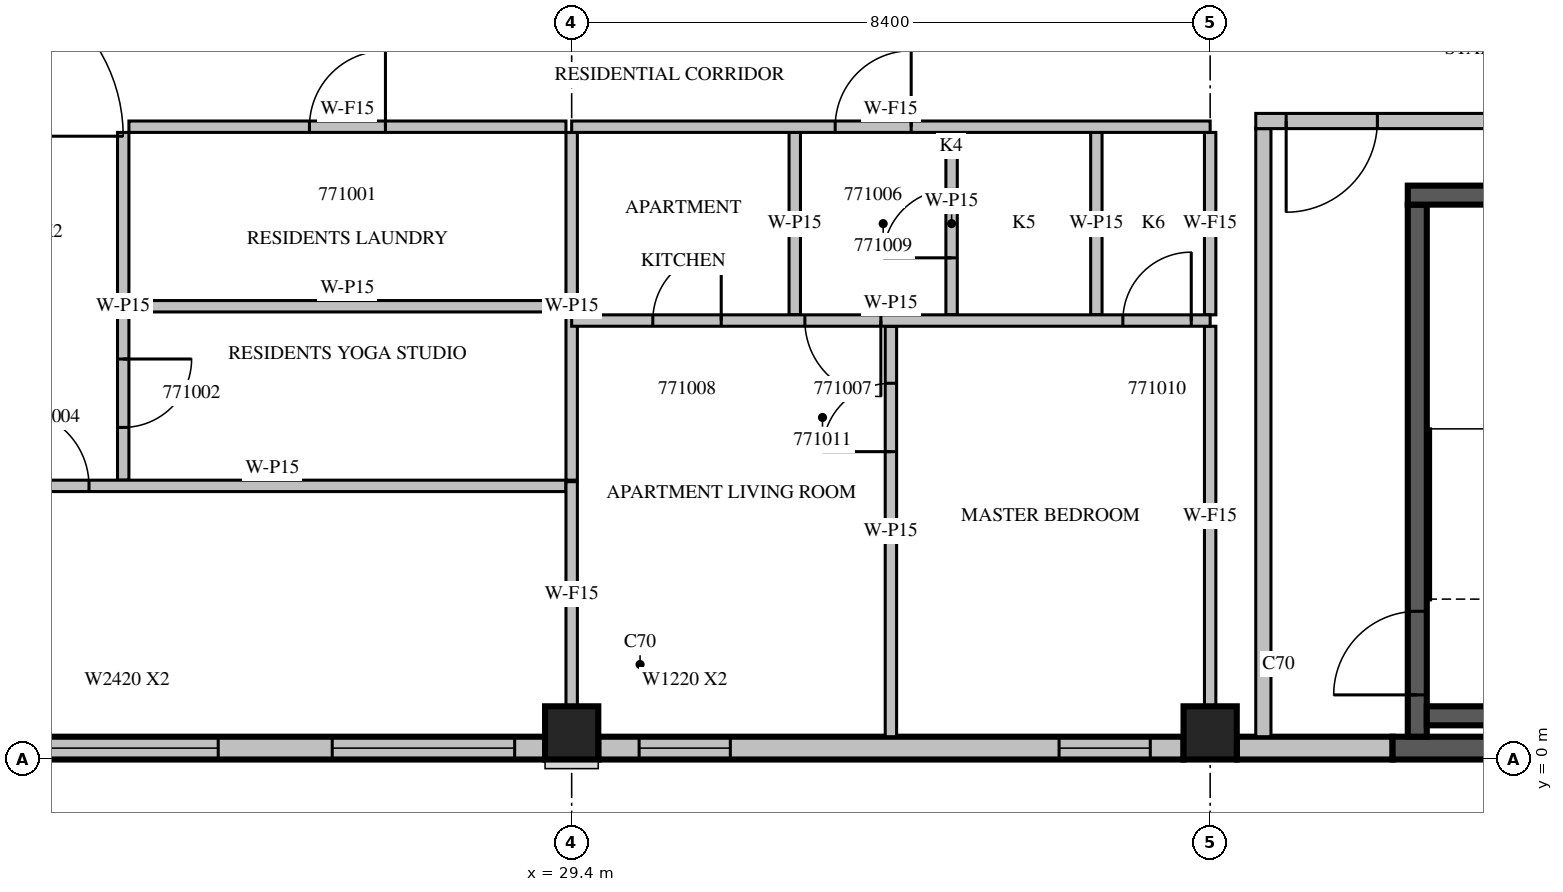
"""IFC4 building model, lengths in metres.
Left out: names, types, materials, properties, quantities, classifications, styles, units other than length and angle.
Written with IfcOpenShell. Run it as: python <this file> out.ifc"""

import sys

from ifc_helpers import new_model, si_unit, direction, frame, frame_2d, origin, origin_2d, place, context, subcontext, project, spatial, rectangle, extrude, source, transform, mapped, element, fill, save


model = new_model("IFC4")
c1 = context("Model", 3, precision=1e-05, world=origin(), true_north=direction((0.0, 1.0)))
c2 = subcontext(c1, "Body", "Model", "MODEL_VIEW")
j1 = project(units=[si_unit("LENGTHUNIT", "METRE"), si_unit("PLANEANGLEUNIT", "RADIAN")], contexts=[c1])
p1 = place(None, origin())
s1 = spatial("IfcSite", under=j1, at=p1, CompositionType="ELEMENT")
p2 = place(p1, origin())
s2 = spatial("IfcBuilding", under=s1, at=p2, CompositionType="ELEMENT")
p3 = place(p2, frame((0.0, 0.0, 309.0)))
s3 = spatial("IfcBuildingStorey", under=s2, at=p3, CompositionType="ELEMENT", Elevation=309.0)
m1 = source(origin(), c2, "Body", "SweptSolid", [
    extrude(rectangle(XDim=0.7, YDim=0.7, at=origin_2d()), origin(), (0.0, 0.0, 1.0), 3.5),
])
for number, where, z_axis, x_axis in (
    (1, (29.4, 0.35, 0.0), (0.0, 0.0, 1.0), (1.0, 0.0, 0.0)),
    (2, (37.8, 0.35, 0.0), (0.0, 0.0, 1.0), (1.0, 0.0, 0.0)),
):
    element("IfcColumn", number, at=place(p3, frame(where, z_axis=z_axis, x_axis=x_axis)), inside=s3, PredefinedType="COLUMN", context=c2, shape_type="MappedRepresentation", body=[
        mapped(m1, transform((0.0, 0.0, 0.0), scale=1.0)),
    ])
m2 = source(origin(), c2, "Body", "SweptSolid", [
    extrude(rectangle(XDim=7.7, YDim=0.3, at=frame_2d((3.85, 0.0))), origin(), (0.0, 0.0, 1.0), 3.1),
])
p4 = place(p3, frame((21.35, 0.15, 0.0), z_axis=(0.0, 0.0, 1.0), x_axis=(1.0, 0.0, 0.0)))
e3 = element("IfcWall", 3, at=p4, inside=s3, PredefinedType="STANDARD", context=c2, shape_type="MappedRepresentation", body=[
    mapped(m2, transform((0.0, 0.0, 0.0), scale=1.0)),
])
m3 = source(origin(), c2, "Body", "SweptSolid", [
    extrude(rectangle(XDim=2.4, YDim=2.0, at=frame_2d((1.2, 1.0))), frame((0.0, 0.16, 0.0), z_axis=(0.0, -1.0, 0.0), x_axis=(1.0, 0.0, 0.0)), (0.0, 0.0, 1.0), 0.32),
])
p5 = place(p4, frame((1.0, 0.0, 0.6)))
e4 = element("IfcOpeningElement", 4, at=p5, cuts=e3, PredefinedType="OPENING", context=c2, shape_type="MappedRepresentation", body=[
    mapped(m3, transform((0.0, 0.0, 0.0), scale=1.0)),
])
p6 = place(p4, frame((4.9, 0.0, 0.6)))
e5 = element("IfcOpeningElement", 5, at=p6, cuts=e3, PredefinedType="OPENING", context=c2, shape_type="MappedRepresentation", body=[
    mapped(m3, transform((0.0, 0.0, 0.0), scale=1.0)),
])
p7 = place(p3, frame((29.75, 0.15, 0.0), z_axis=(0.0, 0.0, 1.0), x_axis=(1.0, 0.0, 0.0)))
e6 = element("IfcWall", 6, at=p7, inside=s3, PredefinedType="STANDARD", context=c2, shape_type="MappedRepresentation", body=[
    mapped(m2, transform((0.0, 0.0, 0.0), scale=1.0)),
])
m4 = source(origin(), c2, "Body", "SweptSolid", [
    extrude(rectangle(XDim=1.2, YDim=2.0, at=frame_2d((0.6, 1.0))), frame((0.0, 0.16, 0.0), z_axis=(0.0, -1.0, 0.0), x_axis=(1.0, 0.0, 0.0)), (0.0, 0.0, 1.0), 0.32),
])
p8 = place(p7, frame((0.537, 0.0, 0.6)))
e7 = element("IfcOpeningElement", 7, at=p8, cuts=e6, PredefinedType="OPENING", context=c2, shape_type="MappedRepresentation", body=[
    mapped(m4, transform((0.0, 0.0, 0.0), scale=1.0)),
])
p9 = place(p7, frame((6.062, 0.0, 0.6)))
e8 = element("IfcOpeningElement", 8, at=p9, cuts=e6, PredefinedType="OPENING", context=c2, shape_type="MappedRepresentation", body=[
    mapped(m4, transform((0.0, 0.0, 0.0), scale=1.0)),
])
m5 = source(origin(), c2, "Body", "SweptSolid", [
    extrude(rectangle(XDim=2.05, YDim=0.3, at=frame_2d((1.025, 0.0))), origin(), (0.0, 0.0, 1.0), 3.1),
])
p10 = place(p3, frame((38.15, 0.15, 0.0), z_axis=(0.0, 0.0, 1.0), x_axis=(1.0, 0.0, 0.0)))
e9 = element("IfcWall", 9, at=p10, inside=s3, PredefinedType="STANDARD", context=c2, shape_type="MappedRepresentation", body=[
    mapped(m5, transform((0.0, 0.0, 0.0), scale=1.0)),
])
m6 = source(origin(), c2, "Body", "SweptSolid", [
    extrude(rectangle(XDim=3.8, YDim=0.3, at=frame_2d((1.9, 0.0))), origin(), (0.0, 0.0, 1.0), 3.1),
])
p11 = place(p3, frame((40.2, 0.15, 0.0), z_axis=(0.0, 0.0, 1.0), x_axis=(1.0, 0.0, 0.0)))
e10 = element("IfcWall", 10, at=p11, inside=s3, PredefinedType="SOLIDWALL", context=c2, shape_type="MappedRepresentation", body=[
    mapped(m6, transform((0.0, 0.0, 0.0), scale=1.0)),
])
m7 = source(origin(), c2, "Body", "SweptSolid", [
    extrude(rectangle(XDim=7.0, YDim=0.25, at=frame_2d((3.5, 0.0))), origin(), (0.0, 0.0, 1.0), 3.1),
])
p12 = place(p3, frame((40.525, 0.3, 0.0), z_axis=(0.0, 0.0, 1.0), x_axis=(0.0, 1.0, 0.0)))
e11 = element("IfcWall", 11, at=p12, inside=s3, PredefinedType="SOLIDWALL", context=c2, shape_type="MappedRepresentation", body=[
    mapped(m7, transform((0.0, 0.0, 0.0), scale=1.0)),
])
m8 = source(origin(), c2, "Body", "SweptSolid", [
    extrude(rectangle(XDim=1.1, YDim=2.1, at=frame_2d((0.55, 1.05))), frame((0.0, 0.135, 0.0), z_axis=(0.0, -1.0, 0.0), x_axis=(1.0, 0.0, 0.0)), (0.0, 0.0, 1.0), 0.27),
])
p13 = place(p12, frame((0.55, 0.0, 0.0)))
e12 = element("IfcOpeningElement", 12, at=p13, cuts=e11, PredefinedType="OPENING", context=c2, shape_type="MappedRepresentation", body=[
    mapped(m8, transform((0.0, 0.0, 0.0), scale=1.0)),
])
m9 = source(origin(), c2, "Body", "SweptSolid", [
    extrude(rectangle(XDim=3.45, YDim=0.25, at=frame_2d((1.725, 0.0))), origin(), (0.0, 0.0, 1.0), 3.1),
])
p14 = place(p3, frame((40.4, 7.425, 0.0), z_axis=(0.0, 0.0, 1.0), x_axis=(1.0, 0.0, 0.0)))
e13 = element("IfcWall", 13, at=p14, inside=s3, PredefinedType="SOLIDWALL", context=c2, shape_type="MappedRepresentation", body=[
    mapped(m9, transform((0.0, 0.0, 0.0), scale=1.0)),
])
m10 = source(origin(), c2, "Body", "SweptSolid", [
    extrude(rectangle(XDim=2.95, YDim=0.25, at=frame_2d((1.475, 0.0))), origin(), (0.0, 0.0, 1.0), 3.1),
])
p15 = place(p3, frame((40.65, 0.575, 0.0), z_axis=(0.0, 0.0, 1.0), x_axis=(1.0, 0.0, 0.0)))
e14 = element("IfcWall", 14, at=p15, inside=s3, PredefinedType="SOLIDWALL", context=c2, shape_type="MappedRepresentation", body=[
    mapped(m10, transform((0.0, 0.0, 0.0), scale=1.0)),
])
m11 = source(origin(), c2, "Body", "SweptSolid", [
    extrude(rectangle(XDim=8.0, YDim=0.2, at=frame_2d((4.0, 0.0))), origin(), (0.0, 0.0, 1.0), 3.1),
])
p16 = place(p3, frame((38.5, 0.3, 0.0), z_axis=(0.0, 0.0, 1.0), x_axis=(0.0, 1.0, 0.0)))
e15 = element("IfcWall", 15, at=p16, inside=s3, PredefinedType="PARTITIONING", context=c2, shape_type="MappedRepresentation", body=[
    mapped(m11, transform((0.0, 0.0, 0.0), scale=1.0)),
])
m12 = source(origin(), c2, "Body", "SweptSolid", [
    extrude(rectangle(XDim=5.45, YDim=0.2, at=frame_2d((2.725, 0.0))), origin(), (0.0, 0.0, 1.0), 3.1),
])
p17 = place(p3, frame((38.4, 8.4, 0.0), z_axis=(0.0, 0.0, 1.0), x_axis=(1.0, 0.0, 0.0)))
e16 = element("IfcWall", 16, at=p17, inside=s3, PredefinedType="PARTITIONING", context=c2, shape_type="MappedRepresentation", body=[
    mapped(m12, transform((0.0, 0.0, 0.0), scale=1.0)),
])
m13 = source(origin(), c2, "Body", "SweptSolid", [
    extrude(rectangle(XDim=1.2, YDim=2.1, at=frame_2d((0.6, 1.05))), frame((0.0, 0.11, 0.0), z_axis=(0.0, -1.0, 0.0), x_axis=(1.0, 0.0, 0.0)), (0.0, 0.0, 1.0), 0.22),
])
p18 = place(p17, frame((0.4, 0.0, 0.0)))
e17 = element("IfcOpeningElement", 17, at=p18, cuts=e16, PredefinedType="OPENING", context=c2, shape_type="MappedRepresentation", body=[
    mapped(m13, transform((0.0, 0.0, 0.0), scale=1.0)),
])
m14 = source(origin(), c2, "Body", "SweptSolid", [
    extrude(rectangle(XDim=0.9, YDim=2.1, at=frame_2d((0.45, 1.05))), frame((0.0, 0.11, 0.0), z_axis=(0.0, -1.0, 0.0), x_axis=(1.0, 0.0, 0.0)), (0.0, 0.0, 1.0), 0.22),
])
p19 = place(p17, frame((3.25, 0.0, 0.0)))
e18 = element("IfcOpeningElement", 18, at=p19, cuts=e16, PredefinedType="OPENING", context=c2, shape_type="MappedRepresentation", body=[
    mapped(m14, transform((0.0, 0.0, 0.0), scale=1.0)),
])
m15 = source(origin(), c2, "Body", "SweptSolid", [
    extrude(rectangle(XDim=4.575, YDim=0.15, at=frame_2d((2.288, 0.0))), origin(), (0.0, 0.0, 1.0), 3.1),
])
p20 = place(p3, frame((23.5, 8.25, 0.0), z_axis=(0.0, 0.0, 1.0), x_axis=(0.0, -1.0, 0.0)))
e19 = element("IfcWall", 19, at=p20, inside=s3, PredefinedType="PARTITIONING", context=c2, shape_type="MappedRepresentation", body=[
    mapped(m15, transform((0.0, 0.0, 0.0), scale=1.0)),
])
m16 = source(origin(), c2, "Body", "SweptSolid", [
    extrude(rectangle(XDim=0.9, YDim=2.1, at=frame_2d((0.45, 1.05))), frame((0.0, 0.085, 0.0), z_axis=(0.0, -1.0, 0.0), x_axis=(1.0, 0.0, 0.0)), (0.0, 0.0, 1.0), 0.17),
])
p21 = place(p20, frame((2.981, 0.0, 0.0)))
e20 = element("IfcOpeningElement", 20, at=p21, cuts=e19, PredefinedType="OPENING", context=c2, shape_type="MappedRepresentation", body=[
    mapped(m16, transform((0.0, 0.0, 0.0), scale=1.0)),
])
p22 = place(p3, frame((29.4, 3.675, 0.0), z_axis=(0.0, 0.0, 1.0), x_axis=(0.0, 1.0, 0.0)))
e21 = element("IfcWall", 21, at=p22, inside=s3, PredefinedType="PARTITIONING", context=c2, shape_type="MappedRepresentation", body=[
    mapped(m15, transform((0.0, 0.0, 0.0), scale=1.0)),
])
m17 = source(origin(), c2, "Body", "SweptSolid", [
    extrude(rectangle(XDim=5.75, YDim=0.15, at=frame_2d((2.875, 0.0))), origin(), (0.0, 0.0, 1.0), 3.1),
])
p23 = place(p3, frame((29.325, 8.325, 0.0), z_axis=(0.0, 0.0, 1.0), x_axis=(-1.0, 0.0, 0.0)))
e22 = element("IfcWall", 22, at=p23, inside=s3, PredefinedType="PARTITIONING", context=c2, shape_type="MappedRepresentation", body=[
    mapped(m17, transform((0.0, 0.0, 0.0), scale=1.0)),
])
m18 = source(origin(), c2, "Body", "SweptSolid", [
    extrude(rectangle(XDim=1.0, YDim=2.1, at=frame_2d((0.5, 1.05))), frame((0.0, 0.085, 0.0), z_axis=(0.0, -1.0, 0.0), x_axis=(1.0, 0.0, 0.0)), (0.0, 0.0, 1.0), 0.17),
])
p24 = place(p23, frame((2.375, 0.0, 0.0)))
e23 = element("IfcOpeningElement", 23, at=p24, cuts=e22, PredefinedType="OPENING", context=c2, shape_type="MappedRepresentation", body=[
    mapped(m18, transform((0.0, 0.0, 0.0), scale=1.0)),
])
p25 = place(p3, frame((29.325, 5.963, 0.0), z_axis=(0.0, 0.0, 1.0), x_axis=(-1.0, 0.0, 0.0)))
e24 = element("IfcWall", 24, at=p25, inside=s3, PredefinedType="PARTITIONING", context=c2, shape_type="MappedRepresentation", body=[
    mapped(m17, transform((0.0, 0.0, 0.0), scale=1.0)),
])
m19 = source(origin(), c2, "Body", "SweptSolid", [
    extrude(rectangle(XDim=7.725, YDim=0.15, at=frame_2d((3.862, 0.0))), origin(), (0.0, 0.0, 1.0), 3.1),
])
p26 = place(p3, frame((21.6, 3.6, 0.0), z_axis=(0.0, 0.0, 1.0), x_axis=(1.0, 0.0, 0.0)))
e25 = element("IfcWall", 25, at=p26, inside=s3, PredefinedType="PARTITIONING", context=c2, shape_type="MappedRepresentation", body=[
    mapped(m19, transform((0.0, 0.0, 0.0), scale=1.0)),
])
p27 = place(p26, frame((0.45, 0.0, 0.0)))
e26 = element("IfcOpeningElement", 26, at=p27, cuts=e25, PredefinedType="OPENING", context=c2, shape_type="MappedRepresentation", body=[
    mapped(m18, transform((0.0, 0.0, 0.0), scale=1.0)),
])
p28 = place(p3, frame((33.6, 0.3, 0.0), z_axis=(0.0, 0.0, 1.0), x_axis=(0.0, 1.0, 0.0)))
e27 = element("IfcWall", 27, at=p28, inside=s3, PredefinedType="PARTITIONING", context=c2, shape_type="SweptSolid", body=[
    extrude(rectangle(XDim=5.4, YDim=0.15, at=frame_2d((2.7, 0.0))), origin(), (0.0, 0.0, 1.0), 3.1),
])
p29 = place(p28, frame((3.75, 0.0, 0.0)))
e28 = element("IfcOpeningElement", 28, at=p29, cuts=e27, PredefinedType="OPENING", context=c2, shape_type="MappedRepresentation", body=[
    mapped(m16, transform((0.0, 0.0, 0.0), scale=1.0)),
])
m20 = source(origin(), c2, "Body", "SweptSolid", [
    extrude(rectangle(XDim=2.4, YDim=0.15, at=frame_2d((1.2, 0.0))), origin(), (0.0, 0.0, 1.0), 3.1),
])
p30 = place(p3, frame((32.335, 5.85, 0.0), z_axis=(0.0, 0.0, 1.0), x_axis=(0.0, 1.0, 0.0)))
e29 = element("IfcWall", 29, at=p30, inside=s3, PredefinedType="PARTITIONING", context=c2, shape_type="MappedRepresentation", body=[
    mapped(m20, transform((0.0, 0.0, 0.0), scale=1.0)),
])
p31 = place(p3, frame((34.398, 5.85, 0.0), z_axis=(0.0, 0.0, 1.0), x_axis=(0.0, 1.0, 0.0)))
e30 = element("IfcWall", 30, at=p31, inside=s3, PredefinedType="PARTITIONING", context=c2, shape_type="MappedRepresentation", body=[
    mapped(m20, transform((0.0, 0.0, 0.0), scale=1.0)),
])
p32 = place(p31, frame((0.75, 0.0, 0.0)))
e31 = element("IfcOpeningElement", 31, at=p32, cuts=e30, PredefinedType="OPENING", context=c2, shape_type="MappedRepresentation", body=[
    mapped(m16, transform((0.0, 0.0, 0.0), scale=1.0)),
])
p33 = place(p3, frame((36.303, 5.85, 0.0), z_axis=(0.0, 0.0, 1.0), x_axis=(0.0, 1.0, 0.0)))
e32 = element("IfcWall", 32, at=p33, inside=s3, PredefinedType="PARTITIONING", context=c2, shape_type="MappedRepresentation", body=[
    mapped(m20, transform((0.0, 0.0, 0.0), scale=1.0)),
])
m21 = source(origin(), c2, "Body", "SweptSolid", [
    extrude(rectangle(XDim=2.956, YDim=0.15, at=frame_2d((1.478, 0.0))), origin(), (0.0, 0.0, 1.0), 3.1),
])
p34 = place(p3, frame((29.4, 0.699, 0.0), z_axis=(0.0, 0.0, 1.0), x_axis=(0.0, 1.0, 0.0)))
e33 = element("IfcWall", 33, at=p34, inside=s3, PredefinedType="PARTITIONING", context=c2, shape_type="MappedRepresentation", body=[
    mapped(m21, transform((0.0, 0.0, 0.0), scale=1.0)),
])
m22 = source(origin(), c2, "Body", "SweptSolid", [
    extrude(rectangle(XDim=5.001, YDim=0.15, at=frame_2d((2.501, 0.0))), origin(), (0.0, 0.0, 1.0), 3.1),
])
p35 = place(p3, frame((37.8, 0.699, 0.0), z_axis=(0.0, 0.0, 1.0), x_axis=(0.0, 1.0, 0.0)))
e34 = element("IfcWall", 34, at=p35, inside=s3, PredefinedType="PARTITIONING", context=c2, shape_type="MappedRepresentation", body=[
    mapped(m22, transform((0.0, 0.0, 0.0), scale=1.0)),
])
p36 = place(p3, frame((37.8, 5.85, 0.0), z_axis=(0.0, 0.0, 1.0), x_axis=(0.0, 1.0, 0.0)))
e35 = element("IfcWall", 35, at=p36, inside=s3, PredefinedType="PARTITIONING", context=c2, shape_type="MappedRepresentation", body=[
    mapped(m20, transform((0.0, 0.0, 0.0), scale=1.0)),
])
m23 = source(origin(), c2, "Body", "SweptSolid", [
    extrude(rectangle(XDim=8.4, YDim=0.15, at=frame_2d((4.2, 0.0))), origin(), (0.0, 0.0, 1.0), 3.1),
])
p37 = place(p3, frame((37.8, 5.775, 0.0), z_axis=(0.0, 0.0, 1.0), x_axis=(-1.0, 0.0, 0.0)))
e36 = element("IfcWall", 36, at=p37, inside=s3, PredefinedType="PARTITIONING", context=c2, shape_type="MappedRepresentation", body=[
    mapped(m23, transform((0.0, 0.0, 0.0), scale=1.0)),
])
p38 = place(p37, frame((4.332, 0.0, 0.0)))
e37 = element("IfcOpeningElement", 37, at=p38, cuts=e36, PredefinedType="OPENING", context=c2, shape_type="MappedRepresentation", body=[
    mapped(m18, transform((0.0, 0.0, 0.0), scale=1.0)),
])
p39 = place(p37, frame((6.433, 0.0, 0.0)))
e38 = element("IfcOpeningElement", 38, at=p39, cuts=e36, PredefinedType="OPENING", context=c2, shape_type="MappedRepresentation", body=[
    mapped(m16, transform((0.0, 0.0, 0.0), scale=1.0)),
])
p40 = place(p37, frame((0.248, 0.0, 0.0)))
e39 = element("IfcOpeningElement", 39, at=p40, cuts=e36, PredefinedType="OPENING", context=c2, shape_type="MappedRepresentation", body=[
    mapped(m16, transform((0.0, 0.0, 0.0), scale=1.0)),
])
p41 = place(p3, frame((37.8, 8.325, 0.0), z_axis=(0.0, 0.0, 1.0), x_axis=(-1.0, 0.0, 0.0)))
e40 = element("IfcWall", 40, at=p41, inside=s3, PredefinedType="PARTITIONING", context=c2, shape_type="MappedRepresentation", body=[
    mapped(m23, transform((0.0, 0.0, 0.0), scale=1.0)),
])
p42 = place(p41, frame((3.933, 0.0, 0.0)))
e41 = element("IfcOpeningElement", 41, at=p42, cuts=e40, PredefinedType="OPENING", context=c2, shape_type="MappedRepresentation", body=[
    mapped(m18, transform((0.0, 0.0, 0.0), scale=1.0)),
])
m24 = source(origin(), c2, "Body", "SweptSolid", [
    extrude(rectangle(XDim=2.4, YDim=2.0, at=frame_2d((1.2, 1.0))), frame((0.0, 0.03, 0.0), z_axis=(0.0, -1.0, 0.0), x_axis=(1.0, 0.0, 0.0)), (0.0, 0.0, 1.0), 0.06),
])
p43 = place(p5, origin())
e42 = element("IfcWindow", 42, at=p43, inside=s3, PartitioningType="SINGLE_PANEL", PredefinedType="WINDOW", context=c2, shape_type="MappedRepresentation", body=[
    mapped(m24, transform((0.0, 0.0, 0.0), scale=1.0)),
])
fill(e4, e42)
p44 = place(p6, origin())
e43 = element("IfcWindow", 43, at=p44, inside=s3, PartitioningType="SINGLE_PANEL", PredefinedType="WINDOW", context=c2, shape_type="MappedRepresentation", body=[
    mapped(m24, transform((0.0, 0.0, 0.0), scale=1.0)),
])
fill(e5, e43)
m25 = source(origin(), c2, "Body", "SweptSolid", [
    extrude(rectangle(XDim=1.2, YDim=2.0, at=frame_2d((0.6, 1.0))), frame((0.0, 0.03, 0.0), z_axis=(0.0, -1.0, 0.0), x_axis=(1.0, 0.0, 0.0)), (0.0, 0.0, 1.0), 0.06),
])
p45 = place(p8, origin())
e44 = element("IfcWindow", 44, at=p45, inside=s3, PartitioningType="SINGLE_PANEL", PredefinedType="WINDOW", context=c2, shape_type="MappedRepresentation", body=[
    mapped(m25, transform((0.0, 0.0, 0.0), scale=1.0)),
])
fill(e7, e44)
p46 = place(p9, origin())
e45 = element("IfcWindow", 45, at=p46, inside=s3, PartitioningType="SINGLE_PANEL", PredefinedType="WINDOW", context=c2, shape_type="MappedRepresentation", body=[
    mapped(m25, transform((0.0, 0.0, 0.0), scale=1.0)),
])
fill(e8, e45)
m26 = source(origin(), c2, "Body", "SweptSolid", [
    extrude(rectangle(XDim=1.1, YDim=2.1, at=frame_2d((0.55, 1.05))), frame((0.0, 0.025, 0.0), z_axis=(0.0, -1.0, 0.0), x_axis=(1.0, 0.0, 0.0)), (0.0, 0.0, 1.0), 0.05),
])
p47 = place(p13, origin())
e46 = element("IfcDoor", 46, at=p47, inside=s3, OperationType="SINGLE_SWING_LEFT", PredefinedType="DOOR", context=c2, shape_type="MappedRepresentation", body=[
    mapped(m26, transform((0.0, 0.0, 0.0), scale=1.0)),
])
fill(e12, e46)
m27 = source(origin(), c2, "Body", "SweptSolid", [
    extrude(rectangle(XDim=1.2, YDim=2.1, at=frame_2d((0.6, 1.05))), frame((0.0, 0.025, 0.0), z_axis=(0.0, -1.0, 0.0), x_axis=(1.0, 0.0, 0.0)), (0.0, 0.0, 1.0), 0.05),
])
p48 = place(p18, origin())
e47 = element("IfcDoor", 47, at=p48, inside=s3, OperationType="SINGLE_SWING_RIGHT", PredefinedType="DOOR", context=c2, shape_type="MappedRepresentation", body=[
    mapped(m27, transform((0.0, 0.0, 0.0), scale=1.0)),
])
fill(e17, e47)
m28 = source(origin(), c2, "Body", "SweptSolid", [
    extrude(rectangle(XDim=1.0, YDim=2.1, at=frame_2d((0.5, 1.05))), frame((0.0, 0.025, 0.0), z_axis=(0.0, -1.0, 0.0), x_axis=(1.0, 0.0, 0.0)), (0.0, 0.0, 1.0), 0.05),
])
p49 = place(p24, origin())
e48 = element("IfcDoor", 48, at=p49, inside=s3, OperationType="SINGLE_SWING_RIGHT", PredefinedType="DOOR", context=c2, shape_type="MappedRepresentation", body=[
    mapped(m28, transform((0.0, 0.0, 0.0), scale=1.0)),
])
fill(e23, e48)
m29 = source(origin(), c2, "Body", "SweptSolid", [
    extrude(rectangle(XDim=0.9, YDim=2.1, at=frame_2d((0.45, 1.05))), frame((0.0, 0.025, 0.0), z_axis=(0.0, -1.0, 0.0), x_axis=(1.0, 0.0, 0.0)), (0.0, 0.0, 1.0), 0.05),
])
p50 = place(p21, origin())
e49 = element("IfcDoor", 49, at=p50, inside=s3, OperationType="SINGLE_SWING_LEFT", PredefinedType="DOOR", context=c2, shape_type="MappedRepresentation", body=[
    mapped(m29, transform((0.0, 0.0, 0.0), scale=1.0)),
])
fill(e20, e49)
p51 = place(p27, origin())
e50 = element("IfcDoor", 50, at=p51, inside=s3, OperationType="SINGLE_SWING_LEFT", PredefinedType="DOOR", context=c2, shape_type="MappedRepresentation", body=[
    mapped(m28, transform((0.0, 0.0, 0.0), scale=1.0)),
])
fill(e26, e50)
p52 = place(p42, origin())
e51 = element("IfcDoor", 51, at=p52, inside=s3, OperationType="SINGLE_SWING_RIGHT", PredefinedType="DOOR", context=c2, shape_type="MappedRepresentation", body=[
    mapped(m28, transform((0.0, 0.0, 0.0), scale=1.0)),
])
fill(e41, e51)
p53 = place(p38, origin())
e52 = element("IfcDoor", 52, at=p53, inside=s3, OperationType="SINGLE_SWING_LEFT", PredefinedType="DOOR", context=c2, shape_type="MappedRepresentation", body=[
    mapped(m28, transform((0.0, 0.0, 0.0), scale=1.0)),
])
fill(e37, e52)
p54 = place(p39, origin())
e53 = element("IfcDoor", 53, at=p54, inside=s3, OperationType="SINGLE_SWING_RIGHT", PredefinedType="DOOR", context=c2, shape_type="MappedRepresentation", body=[
    mapped(m29, transform((0.0, 0.0, 0.0), scale=1.0)),
])
fill(e38, e53)
p55 = place(p32, origin())
e54 = element("IfcDoor", 54, at=p55, inside=s3, OperationType="SINGLE_SWING_LEFT", PredefinedType="DOOR", context=c2, shape_type="MappedRepresentation", body=[
    mapped(m29, transform((0.0, 0.0, 0.0), scale=1.0)),
])
fill(e31, e54)
p56 = place(p40, origin())
e55 = element("IfcDoor", 55, at=p56, inside=s3, OperationType="SINGLE_SWING_RIGHT", PredefinedType="DOOR", context=c2, shape_type="MappedRepresentation", body=[
    mapped(m29, transform((0.0, 0.0, 0.0), scale=1.0)),
])
fill(e39, e55)
p57 = place(p29, origin())
e56 = element("IfcDoor", 56, at=p57, inside=s3, OperationType="SINGLE_SWING_LEFT", PredefinedType="DOOR", context=c2, shape_type="MappedRepresentation", body=[
    mapped(m29, transform((0.0, 0.0, 0.0), scale=1.0)),
])
fill(e28, e56)
save(model, sys.argv[1])
